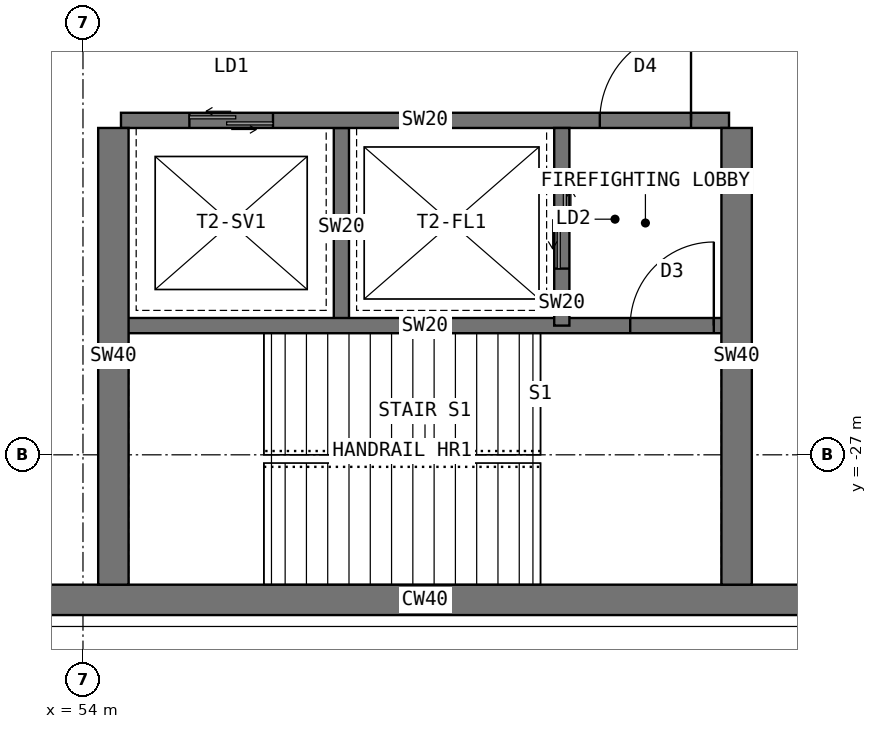
"""IFC4 building model, lengths in metres.
Left out: names, types, materials, properties, quantities, classifications, styles, units other than length and angle.
Written with IfcOpenShell. Run it as: python <this file> out.ifc"""

import sys

from ifc_helpers import new_model, si_unit, direction, frame, frame_2d, origin, place, context, subcontext, project, spatial, rectangle, extrude, element, fill, save


model = new_model("IFC4")
c1 = context("Model", 3, precision=1e-05, world=origin(), true_north=direction((0.0, 1.0)))
c2 = subcontext(c1, "Body", "Model", "MODEL_VIEW")
j1 = project(units=[si_unit("LENGTHUNIT", "METRE"), si_unit("PLANEANGLEUNIT", "RADIAN")], contexts=[c1])
p1 = place(None, origin())
s1 = spatial("IfcSite", under=j1, at=p1, CompositionType="ELEMENT")
p2 = place(p1, origin())
s2 = spatial("IfcBuilding", under=s1, at=p2, CompositionType="ELEMENT")
p3 = place(p2, frame((0.0, 0.0, 291.5)))
s3 = spatial("IfcBuildingStorey", under=s2, at=p3, CompositionType="ELEMENT", Elevation=291.5)
p4 = place(p3, frame((52.202, -28.908, 0.0), z_axis=(0.0, 0.0, 1.0), x_axis=(1.0, 0.0, 0.0)))
e1 = element("IfcWall", 1, at=p4, inside=s3, PredefinedType="SHEAR", context=c2, shape_type="SweptSolid", body=[
    extrude(rectangle(XDim=12.596, YDim=0.4, at=frame_2d((6.298, 0.0))), origin(), (0.0, 0.0, 1.0), 4.55),
])
p5 = place(p3, frame((54.5, -22.6, 0.0), z_axis=(0.0, 0.0, 1.0), x_axis=(1.0, 0.0, 0.0)))
e2 = element("IfcWall", 2, at=p5, inside=s3, PredefinedType="SHEAR", context=c2, shape_type="SweptSolid", body=[
    extrude(rectangle(XDim=8.0, YDim=0.2, at=frame_2d((4.0, 0.0))), origin(), (0.0, 0.0, 1.0), 4.55),
])
p6 = place(p5, frame((6.3, 0.0, 0.0)))
e3 = element("IfcOpeningElement", 3, at=p6, cuts=e2, PredefinedType="OPENING", context=c2, shape_type="SweptSolid", body=[
    extrude(rectangle(XDim=1.2, YDim=2.1, at=frame_2d((0.6, 1.05))), frame((0.0, 0.11, 0.0), z_axis=(0.0, -1.0, 0.0), x_axis=(1.0, 0.0, 0.0)), (0.0, 0.0, 1.0), 0.22),
])
p7 = place(p5, frame((0.9, 0.0, 0.0)))
e4 = element("IfcOpeningElement", 4, at=p7, cuts=e2, PredefinedType="OPENING", context=c2, shape_type="SweptSolid", body=[
    extrude(rectangle(XDim=1.1, YDim=2.2, at=frame_2d((0.55, 1.1))), frame((0.0, 0.11, 0.0), z_axis=(0.0, -1.0, 0.0), x_axis=(1.0, 0.0, 0.0)), (0.0, 0.0, 1.0), 0.22),
])
p8 = place(p3, frame((57.4, -22.7, 0.0), z_axis=(0.0, 0.0, 1.0), x_axis=(0.0, -1.0, 0.0)))
e5 = element("IfcWall", 5, at=p8, inside=s3, PredefinedType="SHEAR", context=c2, shape_type="SweptSolid", body=[
    extrude(rectangle(XDim=2.6, YDim=0.2, at=frame_2d((1.3, 0.0))), origin(), (0.0, 0.0, 1.0), 4.55),
])
p9 = place(p3, frame((60.3, -22.7, 0.0), z_axis=(0.0, 0.0, 1.0), x_axis=(0.0, -1.0, 0.0)))
e6 = element("IfcWall", 6, at=p9, inside=s3, PredefinedType="SHEAR", context=c2, shape_type="SweptSolid", body=[
    extrude(rectangle(XDim=2.6, YDim=0.2, at=frame_2d((1.3, 0.0))), origin(), (0.0, 0.0, 1.0), 4.55),
])
p10 = place(p9, frame((0.55, 0.0, 0.0)))
e7 = element("IfcOpeningElement", 7, at=p10, cuts=e6, PredefinedType="OPENING", context=c2, shape_type="SweptSolid", body=[
    extrude(rectangle(XDim=1.3, YDim=2.2, at=frame_2d((0.65, 1.1))), frame((0.0, 0.11, 0.0), z_axis=(0.0, -1.0, 0.0), x_axis=(1.0, 0.0, 0.0)), (0.0, 0.0, 1.0), 0.22),
])
p11 = place(p3, frame((54.5, -25.3, 0.0), z_axis=(0.0, 0.0, 1.0), x_axis=(1.0, 0.0, 0.0)))
e8 = element("IfcWall", 8, at=p11, inside=s3, PredefinedType="SHEAR", context=c2, shape_type="SweptSolid", body=[
    extrude(rectangle(XDim=8.0, YDim=0.2, at=frame_2d((4.0, 0.0))), origin(), (0.0, 0.0, 1.0), 4.55),
])
p12 = place(p11, frame((6.7, 0.0, 0.0)))
e9 = element("IfcOpeningElement", 9, at=p12, cuts=e8, PredefinedType="OPENING", context=c2, shape_type="SweptSolid", body=[
    extrude(rectangle(XDim=1.1, YDim=2.1, at=frame_2d((0.55, 1.05))), frame((0.0, 0.11, 0.0), z_axis=(0.0, -1.0, 0.0), x_axis=(1.0, 0.0, 0.0)), (0.0, 0.0, 1.0), 0.22),
])
for number, where, z_axis, x_axis in (
    (10, (62.6, -22.7, 0.0), (0.0, 0.0, 1.0), (0.0, -1.0, 0.0)),
    (11, (54.4, -22.7, 0.0), (0.0, 0.0, 1.0), (0.0, -1.0, 0.0)),
):
    element("IfcWall", number, at=place(p3, frame(where, z_axis=z_axis, x_axis=x_axis)), inside=s3, PredefinedType="SHEAR", context=c2, shape_type="SweptSolid", body=[
        extrude(rectangle(XDim=6.008, YDim=0.4, at=frame_2d((3.004, 0.0))), origin(), (0.0, 0.0, 1.0), 4.55),
    ])
p13 = place(p6, origin())
e12 = element("IfcDoor", 12, at=p13, inside=s3, OperationType="SINGLE_SWING_RIGHT", PredefinedType="DOOR", context=c2, shape_type="SweptSolid", body=[
    extrude(rectangle(XDim=1.2, YDim=2.1, at=frame_2d((0.6, 1.05))), frame((0.0, 0.025, 0.0), z_axis=(0.0, -1.0, 0.0), x_axis=(1.0, 0.0, 0.0)), (0.0, 0.0, 1.0), 0.05),
])
fill(e3, e12)
p14 = place(p10, origin())
e13 = element("IfcDoor", 13, at=p14, inside=s3, OperationType="DOUBLE_DOOR_SLIDING", PredefinedType="DOOR", context=c2, shape_type="SweptSolid", body=[
    extrude(rectangle(XDim=1.3, YDim=2.2, at=frame_2d((0.65, 1.1))), frame((0.0, 0.025, 0.0), z_axis=(0.0, -1.0, 0.0), x_axis=(1.0, 0.0, 0.0)), (0.0, 0.0, 1.0), 0.05),
])
fill(e7, e13)
p15 = place(p7, origin())
e14 = element("IfcDoor", 14, at=p15, inside=s3, OperationType="DOUBLE_DOOR_SLIDING", PredefinedType="DOOR", context=c2, shape_type="SweptSolid", body=[
    extrude(rectangle(XDim=1.1, YDim=2.2, at=frame_2d((0.55, 1.1))), frame((0.0, 0.025, 0.0), z_axis=(0.0, -1.0, 0.0), x_axis=(1.0, 0.0, 0.0)), (0.0, 0.0, 1.0), 0.05),
])
fill(e4, e14)
p16 = place(p12, origin())
e15 = element("IfcDoor", 15, at=p16, inside=s3, OperationType="SINGLE_SWING_RIGHT", PredefinedType="DOOR", context=c2, shape_type="SweptSolid", body=[
    extrude(rectangle(XDim=1.1, YDim=2.1, at=frame_2d((0.55, 1.05))), frame((0.0, 0.025, 0.0), z_axis=(0.0, -1.0, 0.0), x_axis=(1.0, 0.0, 0.0)), (0.0, 0.0, 1.0), 0.05),
])
fill(e9, e15)
save(model, sys.argv[1])
